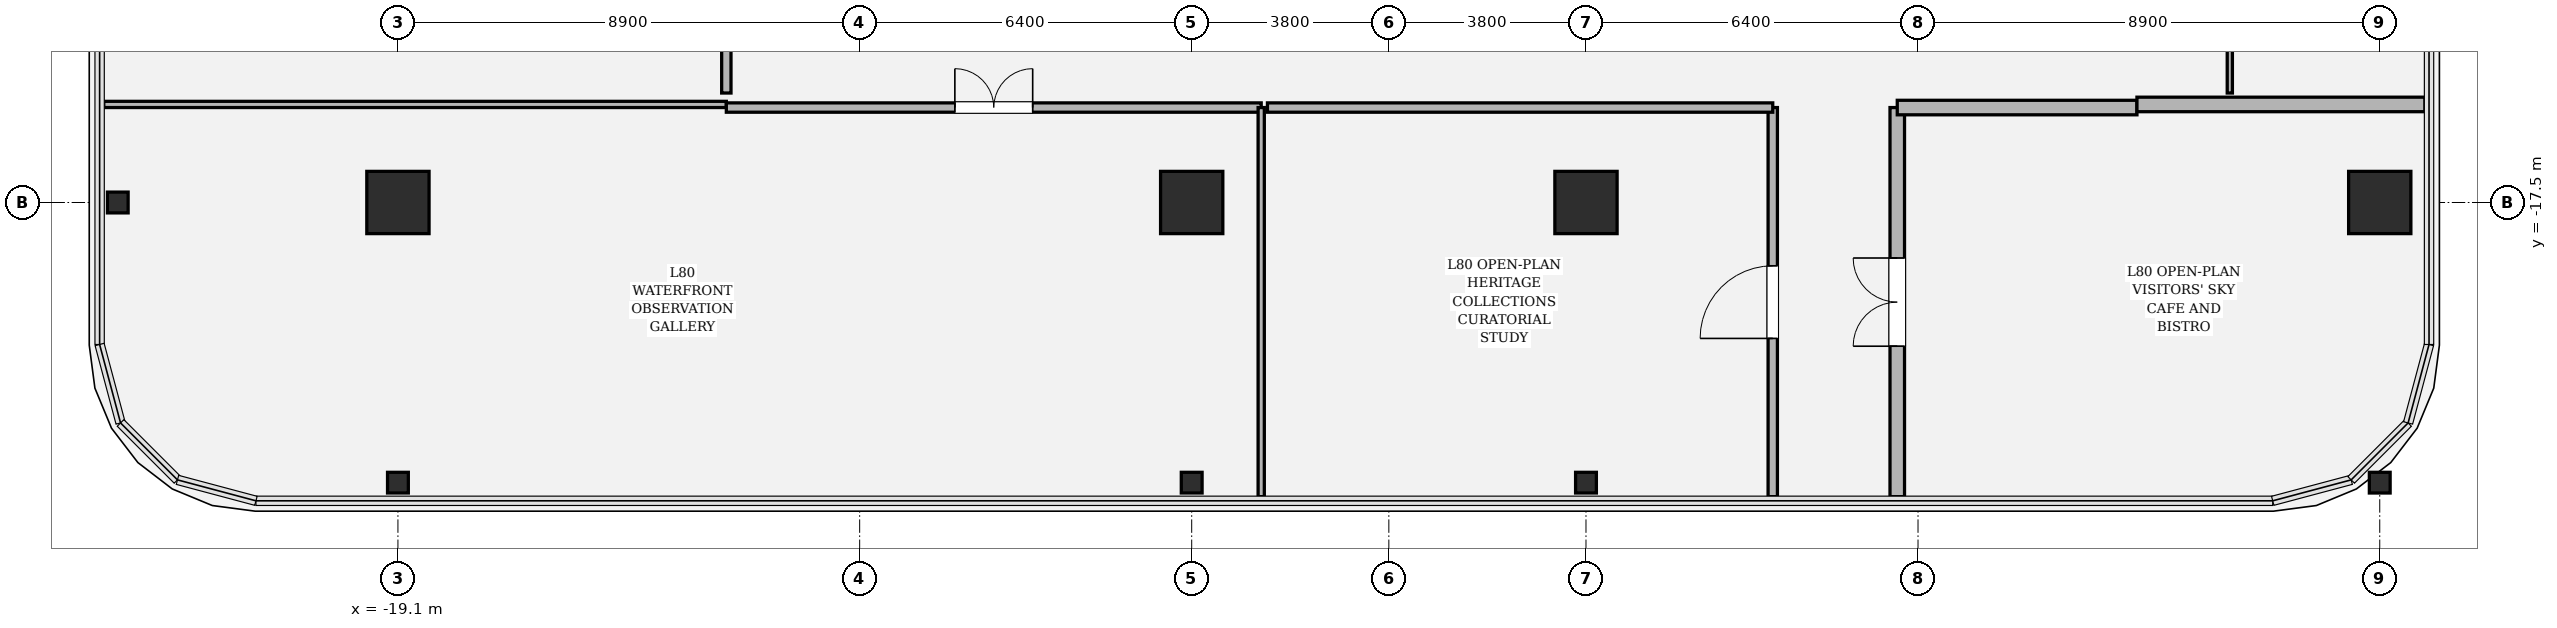
"""IFC4 building model, lengths in metres.
Left out: names, types, materials, properties, quantities, classifications, styles, units other than length and angle.
Written with IfcOpenShell. Run it as: python <this file> out.ifc"""

import sys

from ifc_helpers import new_model, si_unit, direction, frame, frame_2d, origin, origin_2d, place, context, subcontext, project, spatial, rectangle, hollow_rectangle, i_section, extrude, element, fill, save


model = new_model("IFC4")
c1 = context("Model", 3, precision=1e-05, world=origin(), true_north=direction((0.0, 1.0)))
c2 = subcontext(c1, "Body", "Model", "MODEL_VIEW")
j1 = project(units=[si_unit("LENGTHUNIT", "METRE"), si_unit("PLANEANGLEUNIT", "RADIAN")], contexts=[c1])
p1 = place(None, origin())
s1 = spatial("IfcSite", under=j1, at=p1, CompositionType="ELEMENT")
p2 = place(p1, origin())
s2 = spatial("IfcBuilding", under=s1, at=p2, CompositionType="ELEMENT")
p3 = place(p2, frame((0.0, 0.0, 339.0)))
s3 = spatial("IfcBuildingStorey", under=s2, at=p3, CompositionType="ELEMENT", Elevation=339.0)
for number, where, z_axis, x_axis in (
    (1, (-19.1, -17.5, 0.0), (0.0, 0.0, 1.0), (1.0, 0.0, 0.0)),
    (2, (-3.8, -17.5, 0.0), (0.0, 0.0, 1.0), (1.0, 0.0, 0.0)),
    (3, (3.8, -17.5, 0.0), (0.0, 0.0, 1.0), (1.0, 0.0, 0.0)),
    (4, (19.1, -17.5, 0.0), (0.0, 0.0, 1.0), (1.0, 0.0, 0.0)),
):
    element("IfcColumn", number, at=place(p3, frame(where, z_axis=z_axis, x_axis=x_axis)), inside=s3, PredefinedType="COLUMN", context=c2, shape_type="SweptSolid", body=[
        extrude(hollow_rectangle(XDim=1.2, YDim=1.2, WallThickness=0.035, at=origin_2d()), origin(), (0.0, 0.0, 1.0), 4.8),
    ])
for number, where, z_axis, x_axis in (
    (5, (-19.1, -22.9, 0.0), (0.0, 0.0, 1.0), (1.0, 0.0, 0.0)),
    (6, (-3.8, -22.9, 0.0), (0.0, 0.0, 1.0), (1.0, 0.0, 0.0)),
    (7, (3.8, -22.9, 0.0), (0.0, 0.0, 1.0), (1.0, 0.0, 0.0)),
    (8, (19.1, -22.9, 0.0), (0.0, 0.0, 1.0), (1.0, 0.0, 0.0)),
    (9, (-24.5, -17.5, 0.0), (0.0, 0.0, 1.0), (0.0, 1.0, 0.0)),
):
    element("IfcColumn", number, at=place(p3, frame(where, z_axis=z_axis, x_axis=x_axis)), inside=s3, PredefinedType="COLUMN", context=c2, shape_type="SweptSolid", body=[
        extrude(i_section(OverallWidth=0.401, OverallDepth=0.399, WebThickness=0.025, FlangeThickness=0.04, FilletRadius=0.018, at=origin_2d()), origin(), (0.0, 0.0, 1.0), 4.798),
    ])
p4 = place(p3, frame((-24.77, -15.61, 0.0), z_axis=(0.0, 0.0, 1.0), x_axis=(1.0, 0.0, 0.0)))
e10 = element("IfcWall", 10, at=p4, inside=s3, PredefinedType="PARTITIONING", context=c2, shape_type="SweptSolid", body=[
    extrude(rectangle(XDim=12.0, YDim=0.12, at=frame_2d((6.0, 0.0))), origin(), (0.0, 0.0, 1.0), 3.194),
])
p5 = place(p3, frame((-12.77, -15.67, 0.0), z_axis=(0.0, 0.0, 1.0), x_axis=(1.0, 0.0, 0.0)))
e11 = element("IfcWall", 11, at=p5, inside=s3, PredefinedType="PARTITIONING", context=c2, shape_type="SweptSolid", body=[
    extrude(rectangle(XDim=10.31, YDim=0.18, at=frame_2d((5.155, 0.0))), origin(), (0.0, 0.0, 1.0), 3.194),
])
p6 = place(p5, frame((4.405, 0.0, 0.0)))
e12 = element("IfcOpeningElement", 12, at=p6, cuts=e11, PredefinedType="OPENING", context=c2, shape_type="SweptSolid", body=[
    extrude(rectangle(XDim=1.5, YDim=2.3, at=frame_2d((0.75, 1.15))), frame((0.0, 0.1, 0.0), z_axis=(0.0, -1.0, 0.0), x_axis=(1.0, 0.0, 0.0)), (0.0, 0.0, 1.0), 0.2),
])
p7 = place(p3, frame((-2.46, -15.67, 0.0), z_axis=(0.0, 0.0, 1.0), x_axis=(0.0, -1.0, 0.0)))
e13 = element("IfcWall", 13, at=p7, inside=s3, PredefinedType="PARTITIONING", context=c2, shape_type="SweptSolid", body=[
    extrude(rectangle(XDim=7.5, YDim=0.12, at=frame_2d((3.75, 0.0))), origin(), (0.0, 0.0, 1.0), 3.194),
])
p8 = place(p3, frame((7.4, -15.67, 0.0), z_axis=(0.0, 0.0, 1.0), x_axis=(0.0, -1.0, 0.0)))
e14 = element("IfcWall", 14, at=p8, inside=s3, PredefinedType="PARTITIONING", context=c2, shape_type="SweptSolid", body=[
    extrude(rectangle(XDim=7.5, YDim=0.18, at=frame_2d((3.75, 0.0))), origin(), (0.0, 0.0, 1.0), 3.194),
])
p9 = place(p8, frame((3.05, 0.0, 0.0)))
e15 = element("IfcOpeningElement", 15, at=p9, cuts=e14, PredefinedType="OPENING", context=c2, shape_type="SweptSolid", body=[
    extrude(rectangle(XDim=1.4, YDim=2.25, at=frame_2d((0.7, 1.125))), frame((0.0, 0.1, 0.0), z_axis=(0.0, -1.0, 0.0), x_axis=(1.0, 0.0, 0.0)), (0.0, 0.0, 1.0), 0.2),
])
p10 = place(p3, frame((-2.34, -15.67, 0.0), z_axis=(0.0, 0.0, 1.0), x_axis=(1.0, 0.0, 0.0)))
e16 = element("IfcWall", 16, at=p10, inside=s3, PredefinedType="PARTITIONING", context=c2, shape_type="SweptSolid", body=[
    extrude(rectangle(XDim=9.74, YDim=0.18, at=frame_2d((4.87, 0.0))), origin(), (0.0, 0.0, 1.0), 3.194),
])
p11 = place(p3, frame((9.8, -23.17, 0.0), z_axis=(0.0, 0.0, 1.0), x_axis=(0.0, 1.0, 0.0)))
e17 = element("IfcWall", 17, at=p11, inside=s3, PredefinedType="SOLIDWALL", context=c2, shape_type="SweptSolid", body=[
    extrude(rectangle(XDim=7.5, YDim=0.28, at=frame_2d((3.75, 0.0))), origin(), (0.0, 0.0, 1.0), 3.194),
])
p12 = place(p11, frame((2.9, 0.0, 0.0)))
e18 = element("IfcOpeningElement", 18, at=p12, cuts=e17, PredefinedType="OPENING", context=c2, shape_type="SweptSolid", body=[
    extrude(rectangle(XDim=1.7, YDim=2.3, at=frame_2d((0.85, 1.15))), frame((0.0, 0.15, 0.0), z_axis=(0.0, -1.0, 0.0), x_axis=(1.0, 0.0, 0.0)), (0.0, 0.0, 1.0), 0.3),
])
p13 = place(p3, frame((9.8, -15.67, 0.0), z_axis=(0.0, 0.0, 1.0), x_axis=(1.0, 0.0, 0.0)))
e19 = element("IfcWall", 19, at=p13, inside=s3, PredefinedType="SOLIDWALL", context=c2, shape_type="SweptSolid", body=[
    extrude(rectangle(XDim=4.62, YDim=0.28, at=frame_2d((2.31, 0.0))), origin(), (0.0, 0.0, 1.0), 3.194),
])
p14 = place(p3, frame((14.42, -15.61, 0.0), z_axis=(0.0, 0.0, 1.0), x_axis=(1.0, 0.0, 0.0)))
e20 = element("IfcWall", 20, at=p14, inside=s3, PredefinedType="SOLIDWALL", context=c2, shape_type="SweptSolid", body=[
    extrude(rectangle(XDim=5.55, YDim=0.28, at=frame_2d((2.775, 0.0))), origin(), (0.0, 0.0, 1.0), 3.194),
])
p15 = place(p3, frame((-12.77, -13.38, 0.0), z_axis=(0.0, 0.0, 1.0), x_axis=(0.0, -1.0, 0.0)))
e21 = element("IfcWall", 21, at=p15, inside=s3, PredefinedType="PARTITIONING", context=c2, shape_type="SweptSolid", body=[
    extrude(rectangle(XDim=2.01, YDim=0.18, at=frame_2d((1.005, 0.0))), origin(), (0.0, 0.0, 1.0), 4.52),
])
p16 = place(p3, frame((16.21, -15.39, 0.0), z_axis=(0.0, 0.0, 1.0), x_axis=(0.0, 1.0, 0.0)))
e22 = element("IfcWall", 22, at=p16, inside=s3, PredefinedType="PARTITIONING", context=c2, shape_type="SweptSolid", body=[
    extrude(rectangle(XDim=1.57, YDim=0.1, at=frame_2d((0.785, 0.0))), origin(), (0.0, 0.0, 1.0), 4.52),
])
p17 = place(p6, origin())
e23 = element("IfcDoor", 23, at=p17, inside=s3, OperationType="DOUBLE_DOOR_SINGLE_SWING", PredefinedType="DOOR", context=c2, shape_type="SweptSolid", body=[
    extrude(rectangle(XDim=1.5, YDim=2.3, at=frame_2d((0.75, 1.15))), frame((0.0, 0.025, 0.0), z_axis=(0.0, -1.0, 0.0), x_axis=(1.0, 0.0, 0.0)), (0.0, 0.0, 1.0), 0.05),
])
fill(e12, e23)
p18 = place(p9, origin())
e24 = element("IfcDoor", 24, at=p18, inside=s3, OperationType="SINGLE_SWING_RIGHT", PredefinedType="DOOR", context=c2, shape_type="SweptSolid", body=[
    extrude(rectangle(XDim=1.4, YDim=2.25, at=frame_2d((0.7, 1.125))), frame((0.0, 0.025, 0.0), z_axis=(0.0, -1.0, 0.0), x_axis=(1.0, 0.0, 0.0)), (0.0, 0.0, 1.0), 0.05),
])
fill(e15, e24)
p19 = place(p12, origin())
e25 = element("IfcDoor", 25, at=p19, inside=s3, OperationType="DOUBLE_DOOR_SINGLE_SWING", PredefinedType="DOOR", context=c2, shape_type="SweptSolid", body=[
    extrude(rectangle(XDim=1.7, YDim=2.3, at=frame_2d((0.85, 1.15))), frame((0.0, 0.025, 0.0), z_axis=(0.0, -1.0, 0.0), x_axis=(1.0, 0.0, 0.0)), (0.0, 0.0, 1.0), 0.05),
])
fill(e18, e25)
save(model, sys.argv[1])
